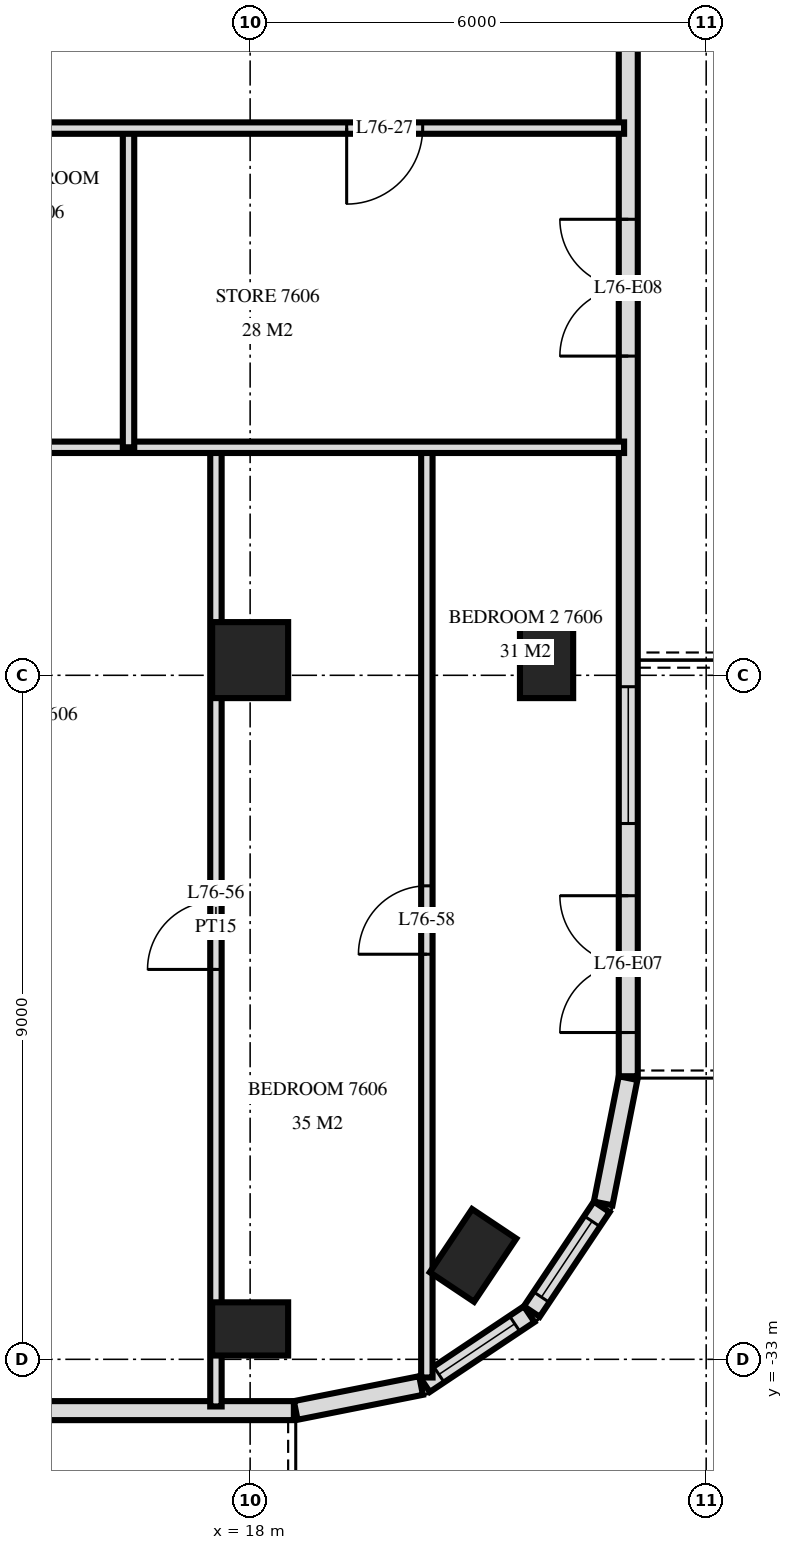
"""IFC4 building model, lengths in metres.
Left out: names, types, materials, properties, quantities, classifications, styles, units other than length and angle.
Written with IfcOpenShell. Run it as: python <this file> out.ifc"""

import sys

from ifc_helpers import new_model, si_unit, direction, frame, frame_2d, origin, origin_2d, place, context, subcontext, project, spatial, rectangle, extrude, element, fill, save


model = new_model("IFC4")
c1 = context("Model", 3, precision=1e-05, world=origin(), true_north=direction((0.0, 1.0)))
c2 = subcontext(c1, "Body", "Model", "MODEL_VIEW")
j1 = project(units=[si_unit("LENGTHUNIT", "METRE"), si_unit("PLANEANGLEUNIT", "RADIAN")], contexts=[c1])
p1 = place(None, origin())
s1 = spatial("IfcSite", under=j1, at=p1, CompositionType="ELEMENT")
p2 = place(p1, origin())
s2 = spatial("IfcBuilding", under=s1, at=p2, CompositionType="ELEMENT")
p3 = place(p2, frame((0.0, 0.0, 287.6)))
s3 = spatial("IfcBuildingStorey", under=s2, at=p3, CompositionType="ELEMENT", Elevation=287.6)
p4 = place(p3, frame((18.0, -32.6, 0.0), z_axis=(0.0, 0.0, 1.0), x_axis=(1.0, 0.0, 0.0)))
e1 = element("IfcColumn", 1, at=p4, inside=s3, PredefinedType="COLUMN", context=c2, shape_type="SweptSolid", body=[
    extrude(rectangle(XDim=1.0, YDim=0.7, at=origin_2d()), origin(), (0.0, 0.0, 1.0), 3.5),
])
p5 = place(p3, frame((18.0, -23.8, 0.0), z_axis=(0.0, 0.0, 1.0), x_axis=(1.0, 0.0, 0.0)))
e2 = element("IfcColumn", 2, at=p5, inside=s3, PredefinedType="COLUMN", context=c2, shape_type="SweptSolid", body=[
    extrude(rectangle(XDim=1.0, YDim=1.0, at=origin_2d()), origin(), (0.0, 0.0, 1.0), 3.5),
])
for number, where, z_axis, x_axis in (
    (3, (20.933, -31.633, 0.0), (0.0, 0.0, 1.0), (0.556, 0.831, 0.0)),
    (4, (21.9, -23.8, 0.0), (0.0, 0.0, 1.0), (0.0, 1.0, 0.0)),
):
    element("IfcColumn", number, at=place(p3, frame(where, z_axis=z_axis, x_axis=x_axis)), inside=s3, PredefinedType="COLUMN", context=c2, shape_type="SweptSolid", body=[
        extrude(rectangle(XDim=1.0, YDim=0.7, at=origin_2d()), origin(), (0.0, 0.0, 1.0), 3.5),
    ])
p6 = place(p3, frame((-18.575, -33.675, 0.0), z_axis=(0.0, 0.0, 1.0), x_axis=(1.0, 0.0, 0.0)))
e5 = element("IfcWall", 5, at=p6, inside=s3, PredefinedType="SOLIDWALL", context=c2, shape_type="SweptSolid", body=[
    extrude(rectangle(XDim=37.151, YDim=0.25, at=frame_2d((18.575, 0.0))), origin(), (0.0, 0.0, 1.0), 3.22),
])
p7 = place(p6, frame((1.175, 0.0, 0.0)))
e6 = element("IfcOpeningElement", 6, at=p7, cuts=e5, PredefinedType="OPENING", context=c2, shape_type="SweptSolid", body=[
    extrude(rectangle(XDim=1.8, YDim=2.4, at=frame_2d((0.9, 1.2))), frame((0.0, 0.135, 0.0), z_axis=(0.0, -1.0, 0.0), x_axis=(1.0, 0.0, 0.0)), (0.0, 0.0, 1.0), 0.27),
])
p8 = place(p6, frame((4.4, 0.0, 0.9)))
e7 = element("IfcOpeningElement", 7, at=p8, cuts=e5, PredefinedType="OPENING", context=c2, shape_type="SweptSolid", body=[
    extrude(rectangle(XDim=1.8, YDim=1.5, at=frame_2d((0.9, 0.75))), frame((0.0, 0.135, 0.0), z_axis=(0.0, -1.0, 0.0), x_axis=(1.0, 0.0, 0.0)), (0.0, 0.0, 1.0), 0.27),
])
p9 = place(p6, frame((6.875, 0.0, 0.9)))
e8 = element("IfcOpeningElement", 8, at=p9, cuts=e5, PredefinedType="OPENING", context=c2, shape_type="SweptSolid", body=[
    extrude(rectangle(XDim=2.4, YDim=1.5, at=frame_2d((1.2, 0.75))), frame((0.0, 0.135, 0.0), z_axis=(0.0, -1.0, 0.0), x_axis=(1.0, 0.0, 0.0)), (0.0, 0.0, 1.0), 0.27),
])
p10 = place(p6, frame((10.175, 0.0, 0.0)))
e9 = element("IfcOpeningElement", 9, at=p10, cuts=e5, PredefinedType="OPENING", context=c2, shape_type="SweptSolid", body=[
    extrude(rectangle(XDim=1.8, YDim=2.4, at=frame_2d((0.9, 1.2))), frame((0.0, 0.135, 0.0), z_axis=(0.0, -1.0, 0.0), x_axis=(1.0, 0.0, 0.0)), (0.0, 0.0, 1.0), 0.27),
])
p11 = place(p6, frame((13.175, 0.0, 0.0)))
e10 = element("IfcOpeningElement", 10, at=p11, cuts=e5, PredefinedType="OPENING", context=c2, shape_type="SweptSolid", body=[
    extrude(rectangle(XDim=1.8, YDim=2.4, at=frame_2d((0.9, 1.2))), frame((0.0, 0.135, 0.0), z_axis=(0.0, -1.0, 0.0), x_axis=(1.0, 0.0, 0.0)), (0.0, 0.0, 1.0), 0.27),
])
p12 = place(p6, frame((15.875, 0.0, 0.9)))
e11 = element("IfcOpeningElement", 11, at=p12, cuts=e5, PredefinedType="OPENING", context=c2, shape_type="SweptSolid", body=[
    extrude(rectangle(XDim=2.4, YDim=1.5, at=frame_2d((1.2, 0.75))), frame((0.0, 0.135, 0.0), z_axis=(0.0, -1.0, 0.0), x_axis=(1.0, 0.0, 0.0)), (0.0, 0.0, 1.0), 0.27),
])
p13 = place(p6, frame((19.175, 0.0, 0.0)))
e12 = element("IfcOpeningElement", 12, at=p13, cuts=e5, PredefinedType="OPENING", context=c2, shape_type="SweptSolid", body=[
    extrude(rectangle(XDim=1.8, YDim=2.4, at=frame_2d((0.9, 1.2))), frame((0.0, 0.135, 0.0), z_axis=(0.0, -1.0, 0.0), x_axis=(1.0, 0.0, 0.0)), (0.0, 0.0, 1.0), 0.27),
])
p14 = place(p6, frame((21.875, 0.0, 0.9)))
e13 = element("IfcOpeningElement", 13, at=p14, cuts=e5, PredefinedType="OPENING", context=c2, shape_type="SweptSolid", body=[
    extrude(rectangle(XDim=2.4, YDim=1.5, at=frame_2d((1.2, 0.75))), frame((0.0, 0.135, 0.0), z_axis=(0.0, -1.0, 0.0), x_axis=(1.0, 0.0, 0.0)), (0.0, 0.0, 1.0), 0.27),
])
p15 = place(p6, frame((25.063, 0.0, 0.9)))
e14 = element("IfcOpeningElement", 14, at=p15, cuts=e5, PredefinedType="OPENING", context=c2, shape_type="SweptSolid", body=[
    extrude(rectangle(XDim=1.8, YDim=1.5, at=frame_2d((0.9, 0.75))), frame((0.0, 0.135, 0.0), z_axis=(0.0, -1.0, 0.0), x_axis=(1.0, 0.0, 0.0)), (0.0, 0.0, 1.0), 0.27),
])
p16 = place(p6, frame((27.838, 0.0, 0.0)))
e15 = element("IfcOpeningElement", 15, at=p16, cuts=e5, PredefinedType="OPENING", context=c2, shape_type="SweptSolid", body=[
    extrude(rectangle(XDim=1.8, YDim=2.4, at=frame_2d((0.9, 1.2))), frame((0.0, 0.135, 0.0), z_axis=(0.0, -1.0, 0.0), x_axis=(1.0, 0.0, 0.0)), (0.0, 0.0, 1.0), 0.27),
])
p17 = place(p6, frame((31.175, 0.0, 0.0)))
e16 = element("IfcOpeningElement", 16, at=p17, cuts=e5, PredefinedType="OPENING", context=c2, shape_type="SweptSolid", body=[
    extrude(rectangle(XDim=1.8, YDim=2.4, at=frame_2d((0.9, 1.2))), frame((0.0, 0.135, 0.0), z_axis=(0.0, -1.0, 0.0), x_axis=(1.0, 0.0, 0.0)), (0.0, 0.0, 1.0), 0.27),
])
p18 = place(p3, frame((18.6, -33.673, 0.0), z_axis=(0.0, 0.0, 1.0), x_axis=(0.980770110232, 0.195166572128, 0.0)))
e17 = element("IfcWall", 17, at=p18, inside=s3, PredefinedType="SOLIDWALL", context=c2, shape_type="SweptSolid", body=[
    extrude(rectangle(XDim=1.681, YDim=0.25, at=frame_2d((0.841, 0.0))), origin(), (0.0, 0.0, 1.0), 3.22),
])
p19 = place(p3, frame((20.294, -33.326, 0.0), z_axis=(0.0, 0.0, 1.0), x_axis=(0.831482937015, 0.55555029066, 0.0)))
e18 = element("IfcWall", 18, at=p19, inside=s3, PredefinedType="SOLIDWALL", context=c2, shape_type="SweptSolid", body=[
    extrude(rectangle(XDim=1.656, YDim=0.25, at=frame_2d((0.828, 0.0))), origin(), (0.0, 0.0, 1.0), 3.22),
])
p20 = place(p19, frame((0.228, 0.0, 0.9)))
e19 = element("IfcOpeningElement", 19, at=p20, cuts=e18, PredefinedType="OPENING", context=c2, shape_type="SweptSolid", body=[
    extrude(rectangle(XDim=1.2, YDim=1.5, at=frame_2d((0.6, 0.75))), frame((0.0, 0.135, 0.0), z_axis=(0.0, -1.0, 0.0), x_axis=(1.0, 0.0, 0.0)), (0.0, 0.0, 1.0), 0.27),
])
p21 = place(p3, frame((21.706, -32.371, 0.0), z_axis=(0.0, 0.0, 1.0), x_axis=(0.55555029066, 0.831482937015, 0.0)))
e20 = element("IfcWall", 20, at=p21, inside=s3, PredefinedType="SOLIDWALL", context=c2, shape_type="SweptSolid", body=[
    extrude(rectangle(XDim=1.656, YDim=0.25, at=frame_2d((0.828, 0.0))), origin(), (0.0, 0.0, 1.0), 3.22),
])
p22 = place(p21, frame((0.228, 0.0, 0.9)))
e21 = element("IfcOpeningElement", 21, at=p22, cuts=e20, PredefinedType="OPENING", context=c2, shape_type="SweptSolid", body=[
    extrude(rectangle(XDim=1.2, YDim=1.5, at=frame_2d((0.6, 0.75))), frame((0.0, 0.135, 0.0), z_axis=(0.0, -1.0, 0.0), x_axis=(1.0, 0.0, 0.0)), (0.0, 0.0, 1.0), 0.27),
])
p23 = place(p3, frame((22.645, -30.949, 0.0), z_axis=(0.0, 0.0, 1.0), x_axis=(0.19513878023, 0.980775640221, 0.0)))
e22 = element("IfcWall", 22, at=p23, inside=s3, PredefinedType="SOLIDWALL", context=c2, shape_type="SweptSolid", body=[
    extrude(rectangle(XDim=1.681, YDim=0.25, at=frame_2d((0.841, 0.0))), origin(), (0.0, 0.0, 1.0), 3.22),
])
p24 = place(p3, frame((22.975, -29.275, 0.0), z_axis=(0.0, 0.0, 1.0), x_axis=(0.0, 1.0, 0.0)))
e23 = element("IfcWall", 23, at=p24, inside=s3, PredefinedType="SOLIDWALL", context=c2, shape_type="SweptSolid", body=[
    extrude(rectangle(XDim=25.951, YDim=0.25, at=frame_2d((12.975, 0.0))), origin(), (0.0, 0.0, 1.0), 3.22),
])
p25 = place(p24, frame((0.575, 0.0, 0.0)))
e24 = element("IfcOpeningElement", 24, at=p25, cuts=e23, PredefinedType="OPENING", context=c2, shape_type="SweptSolid", body=[
    extrude(rectangle(XDim=1.8, YDim=2.4, at=frame_2d((0.9, 1.2))), frame((0.0, 0.135, 0.0), z_axis=(0.0, -1.0, 0.0), x_axis=(1.0, 0.0, 0.0)), (0.0, 0.0, 1.0), 0.27),
])
p26 = place(p24, frame((3.325, 0.0, 0.9)))
e25 = element("IfcOpeningElement", 25, at=p26, cuts=e23, PredefinedType="OPENING", context=c2, shape_type="SweptSolid", body=[
    extrude(rectangle(XDim=1.8, YDim=1.5, at=frame_2d((0.9, 0.75))), frame((0.0, 0.135, 0.0), z_axis=(0.0, -1.0, 0.0), x_axis=(1.0, 0.0, 0.0)), (0.0, 0.0, 1.0), 0.27),
])
p27 = place(p24, frame((9.475, 0.0, 0.0)))
e26 = element("IfcOpeningElement", 26, at=p27, cuts=e23, PredefinedType="OPENING", context=c2, shape_type="SweptSolid", body=[
    extrude(rectangle(XDim=1.8, YDim=2.4, at=frame_2d((0.9, 1.2))), frame((0.0, 0.135, 0.0), z_axis=(0.0, -1.0, 0.0), x_axis=(1.0, 0.0, 0.0)), (0.0, 0.0, 1.0), 0.27),
])
p28 = place(p24, frame((16.175, 0.0, 0.0)))
e27 = element("IfcOpeningElement", 27, at=p28, cuts=e23, PredefinedType="OPENING", context=c2, shape_type="SweptSolid", body=[
    extrude(rectangle(XDim=1.8, YDim=2.4, at=frame_2d((0.9, 1.2))), frame((0.0, 0.135, 0.0), z_axis=(0.0, -1.0, 0.0), x_axis=(1.0, 0.0, 0.0)), (0.0, 0.0, 1.0), 0.27),
])
p29 = place(p24, frame((22.675, 0.0, 0.0)))
e28 = element("IfcOpeningElement", 28, at=p29, cuts=e23, PredefinedType="OPENING", context=c2, shape_type="SweptSolid", body=[
    extrude(rectangle(XDim=1.8, YDim=2.4, at=frame_2d((0.9, 1.2))), frame((0.0, 0.135, 0.0), z_axis=(0.0, -1.0, 0.0), x_axis=(1.0, 0.0, 0.0)), (0.0, 0.0, 1.0), 0.27),
])
p30 = place(p3, frame((20.325, -33.239, 0.0), z_axis=(0.0, 0.0, 1.0), x_axis=(0.0, 1.0, 0.0)))
e29 = element("IfcWall", 29, at=p30, inside=s3, PredefinedType="PARTITIONING", context=c2, shape_type="SweptSolid", body=[
    extrude(rectangle(XDim=12.239, YDim=0.15, at=frame_2d((6.12, 0.0))), origin(), (0.0, 0.0, 1.0), 3.22),
])
p31 = place(p30, frame((5.569, 0.0, 0.0)))
e30 = element("IfcOpeningElement", 30, at=p31, cuts=e29, PredefinedType="OPENING", context=c2, shape_type="SweptSolid", body=[
    extrude(rectangle(XDim=0.9, YDim=2.1, at=frame_2d((0.45, 1.05))), frame((0.0, 0.085, 0.0), z_axis=(0.0, -1.0, 0.0), x_axis=(1.0, 0.0, 0.0)), (0.0, 0.0, 1.0), 0.17),
])
p32 = place(p3, frame((17.55, -33.62, 0.0), z_axis=(0.0, 0.0, 1.0), x_axis=(0.0, 1.0, 0.0)))
e31 = element("IfcWall", 31, at=p32, inside=s3, PredefinedType="PARTITIONING", context=c2, shape_type="SweptSolid", body=[
    extrude(rectangle(XDim=12.62, YDim=0.15, at=frame_2d((6.31, 0.0))), origin(), (0.0, 0.0, 1.0), 3.22),
])
p33 = place(p32, frame((5.75, 0.0, 0.0)))
e32 = element("IfcOpeningElement", 32, at=p33, cuts=e31, PredefinedType="OPENING", context=c2, shape_type="SweptSolid", body=[
    extrude(rectangle(XDim=0.9, YDim=2.1, at=frame_2d((0.45, 1.05))), frame((0.0, 0.085, 0.0), z_axis=(0.0, -1.0, 0.0), x_axis=(1.0, 0.0, 0.0)), (0.0, 0.0, 1.0), 0.17),
])
p34 = place(p3, frame((16.4, -21.0, 0.0), z_axis=(0.0, 0.0, 1.0), x_axis=(0.0, 1.0, 0.0)))
e33 = element("IfcWall", 33, at=p34, inside=s3, PredefinedType="PARTITIONING", context=c2, shape_type="SweptSolid", body=[
    extrude(rectangle(XDim=4.2, YDim=0.15, at=frame_2d((2.1, 0.0))), origin(), (0.0, 0.0, 1.0), 3.22),
])
p35 = place(p3, frame((14.0, -21.0, 0.0), z_axis=(0.0, 0.0, 1.0), x_axis=(1.0, 0.0, 0.0)))
e34 = element("IfcWall", 34, at=p35, inside=s3, PredefinedType="PARTITIONING", context=c2, shape_type="SweptSolid", body=[
    extrude(rectangle(XDim=8.92, YDim=0.15, at=frame_2d((4.46, 0.0))), origin(), (0.0, 0.0, 1.0), 3.22),
])
p36 = place(p3, frame((-22.92, -16.8, 0.0), z_axis=(0.0, 0.0, 1.0), x_axis=(1.0, 0.0, 0.0)))
e35 = element("IfcWall", 35, at=p36, inside=s3, PredefinedType="PARTITIONING", context=c2, shape_type="SweptSolid", body=[
    extrude(rectangle(XDim=45.84, YDim=0.15, at=frame_2d((22.92, 0.0))), origin(), (0.0, 0.0, 1.0), 3.22),
])
p37 = place(p36, frame((16.72, 0.0, 0.0)))
e36 = element("IfcOpeningElement", 36, at=p37, cuts=e35, PredefinedType="OPENING", context=c2, shape_type="SweptSolid", body=[
    extrude(rectangle(XDim=1.0, YDim=2.1, at=frame_2d((0.5, 1.05))), frame((0.0, 0.085, 0.0), z_axis=(0.0, -1.0, 0.0), x_axis=(1.0, 0.0, 0.0)), (0.0, 0.0, 1.0), 0.17),
])
p38 = place(p36, frame((18.52, 0.0, 0.0)))
e37 = element("IfcOpeningElement", 37, at=p38, cuts=e35, PredefinedType="OPENING", context=c2, shape_type="SweptSolid", body=[
    extrude(rectangle(XDim=1.0, YDim=2.1, at=frame_2d((0.5, 1.05))), frame((0.0, 0.085, 0.0), z_axis=(0.0, -1.0, 0.0), x_axis=(1.0, 0.0, 0.0)), (0.0, 0.0, 1.0), 0.17),
])
p39 = place(p36, frame((21.77, 0.0, 0.0)))
e38 = element("IfcOpeningElement", 38, at=p39, cuts=e35, PredefinedType="OPENING", context=c2, shape_type="SweptSolid", body=[
    extrude(rectangle(XDim=1.0, YDim=2.1, at=frame_2d((0.5, 1.05))), frame((0.0, 0.085, 0.0), z_axis=(0.0, -1.0, 0.0), x_axis=(1.0, 0.0, 0.0)), (0.0, 0.0, 1.0), 0.17),
])
p40 = place(p36, frame((23.07, 0.0, 0.0)))
e39 = element("IfcOpeningElement", 39, at=p40, cuts=e35, PredefinedType="OPENING", context=c2, shape_type="SweptSolid", body=[
    extrude(rectangle(XDim=1.0, YDim=2.1, at=frame_2d((0.5, 1.05))), frame((0.0, 0.085, 0.0), z_axis=(0.0, -1.0, 0.0), x_axis=(1.0, 0.0, 0.0)), (0.0, 0.0, 1.0), 0.17),
])
p41 = place(p36, frame((27.77, 0.0, 0.0)))
e40 = element("IfcOpeningElement", 40, at=p41, cuts=e35, PredefinedType="OPENING", context=c2, shape_type="SweptSolid", body=[
    extrude(rectangle(XDim=1.0, YDim=2.1, at=frame_2d((0.5, 1.05))), frame((0.0, 0.085, 0.0), z_axis=(0.0, -1.0, 0.0), x_axis=(1.0, 0.0, 0.0)), (0.0, 0.0, 1.0), 0.17),
])
p42 = place(p36, frame((7.02, 0.0, 0.0)))
e41 = element("IfcOpeningElement", 41, at=p42, cuts=e35, PredefinedType="OPENING", context=c2, shape_type="SweptSolid", body=[
    extrude(rectangle(XDim=1.0, YDim=2.1, at=frame_2d((0.5, 1.05))), frame((0.0, 0.085, 0.0), z_axis=(0.0, -1.0, 0.0), x_axis=(1.0, 0.0, 0.0)), (0.0, 0.0, 1.0), 0.17),
])
p43 = place(p36, frame((35.42, 0.0, 0.0)))
e42 = element("IfcOpeningElement", 42, at=p43, cuts=e35, PredefinedType="OPENING", context=c2, shape_type="SweptSolid", body=[
    extrude(rectangle(XDim=1.0, YDim=2.1, at=frame_2d((0.5, 1.05))), frame((0.0, 0.085, 0.0), z_axis=(0.0, -1.0, 0.0), x_axis=(1.0, 0.0, 0.0)), (0.0, 0.0, 1.0), 0.17),
])
p44 = place(p36, frame((42.19, 0.0, 0.0)))
e43 = element("IfcOpeningElement", 43, at=p44, cuts=e35, PredefinedType="OPENING", context=c2, shape_type="SweptSolid", body=[
    extrude(rectangle(XDim=1.0, YDim=2.1, at=frame_2d((0.5, 1.05))), frame((0.0, 0.085, 0.0), z_axis=(0.0, -1.0, 0.0), x_axis=(1.0, 0.0, 0.0)), (0.0, 0.0, 1.0), 0.17),
])
p45 = place(p20, origin())
e44 = element("IfcWindow", 44, at=p45, inside=s3, PartitioningType="SINGLE_PANEL", PredefinedType="WINDOW", context=c2, shape_type="SweptSolid", body=[
    extrude(rectangle(XDim=1.2, YDim=1.5, at=frame_2d((0.6, 0.75))), frame((0.0, 0.03, 0.0), z_axis=(0.0, -1.0, 0.0), x_axis=(1.0, 0.0, 0.0)), (0.0, 0.0, 1.0), 0.06),
])
fill(e19, e44)
p46 = place(p22, origin())
e45 = element("IfcWindow", 45, at=p46, inside=s3, PartitioningType="SINGLE_PANEL", PredefinedType="WINDOW", context=c2, shape_type="SweptSolid", body=[
    extrude(rectangle(XDim=1.2, YDim=1.5, at=frame_2d((0.6, 0.75))), frame((0.0, 0.03, 0.0), z_axis=(0.0, -1.0, 0.0), x_axis=(1.0, 0.0, 0.0)), (0.0, 0.0, 1.0), 0.06),
])
fill(e21, e45)
p47 = place(p25, origin())
e46 = element("IfcDoor", 46, at=p47, inside=s3, OperationType="DOUBLE_DOOR_SINGLE_SWING", PredefinedType="DOOR", context=c2, shape_type="SweptSolid", body=[
    extrude(rectangle(XDim=1.8, YDim=2.4, at=frame_2d((0.9, 1.2))), frame((0.0, 0.025, 0.0), z_axis=(0.0, -1.0, 0.0), x_axis=(1.0, 0.0, 0.0)), (0.0, 0.0, 1.0), 0.05),
])
fill(e24, e46)
p48 = place(p26, origin())
e47 = element("IfcWindow", 47, at=p48, inside=s3, PartitioningType="SINGLE_PANEL", PredefinedType="WINDOW", context=c2, shape_type="SweptSolid", body=[
    extrude(rectangle(XDim=1.8, YDim=1.5, at=frame_2d((0.9, 0.75))), frame((0.0, 0.03, 0.0), z_axis=(0.0, -1.0, 0.0), x_axis=(1.0, 0.0, 0.0)), (0.0, 0.0, 1.0), 0.06),
])
fill(e25, e47)
p49 = place(p27, origin())
e48 = element("IfcDoor", 48, at=p49, inside=s3, OperationType="DOUBLE_DOOR_SINGLE_SWING", PredefinedType="DOOR", context=c2, shape_type="SweptSolid", body=[
    extrude(rectangle(XDim=1.8, YDim=2.4, at=frame_2d((0.9, 1.2))), frame((0.0, 0.025, 0.0), z_axis=(0.0, -1.0, 0.0), x_axis=(1.0, 0.0, 0.0)), (0.0, 0.0, 1.0), 0.05),
])
fill(e26, e48)
p50 = place(p44, frame((0.5, 0.0, 0.0), z_axis=(0.0, 0.0, 1.0), x_axis=(-1.0, 0.0, 0.0)))
e49 = element("IfcDoor", 49, at=p50, inside=s3, OperationType="SINGLE_SWING_LEFT", PredefinedType="DOOR", context=c2, shape_type="SweptSolid", body=[
    extrude(rectangle(XDim=1.0, YDim=2.1, at=frame_2d((0.0, 1.05))), frame((0.0, -0.025, 0.0), z_axis=(0.0, 1.0, 0.0), x_axis=(-1.0, 0.0, 0.0)), (0.0, 0.0, 1.0), 0.05),
])
fill(e43, e49)
p51 = place(p33, origin())
e50 = element("IfcDoor", 50, at=p51, inside=s3, OperationType="SINGLE_SWING_RIGHT", PredefinedType="DOOR", context=c2, shape_type="SweptSolid", body=[
    extrude(rectangle(XDim=0.9, YDim=2.1, at=frame_2d((0.45, 1.05))), frame((0.0, 0.025, 0.0), z_axis=(0.0, -1.0, 0.0), x_axis=(1.0, 0.0, 0.0)), (0.0, 0.0, 1.0), 0.05),
])
fill(e32, e50)
p52 = place(p31, origin())
e51 = element("IfcDoor", 51, at=p52, inside=s3, OperationType="SINGLE_SWING_RIGHT", PredefinedType="DOOR", context=c2, shape_type="SweptSolid", body=[
    extrude(rectangle(XDim=0.9, YDim=2.1, at=frame_2d((0.45, 1.05))), frame((0.0, 0.025, 0.0), z_axis=(0.0, -1.0, 0.0), x_axis=(1.0, 0.0, 0.0)), (0.0, 0.0, 1.0), 0.05),
])
fill(e30, e51)
save(model, sys.argv[1])
